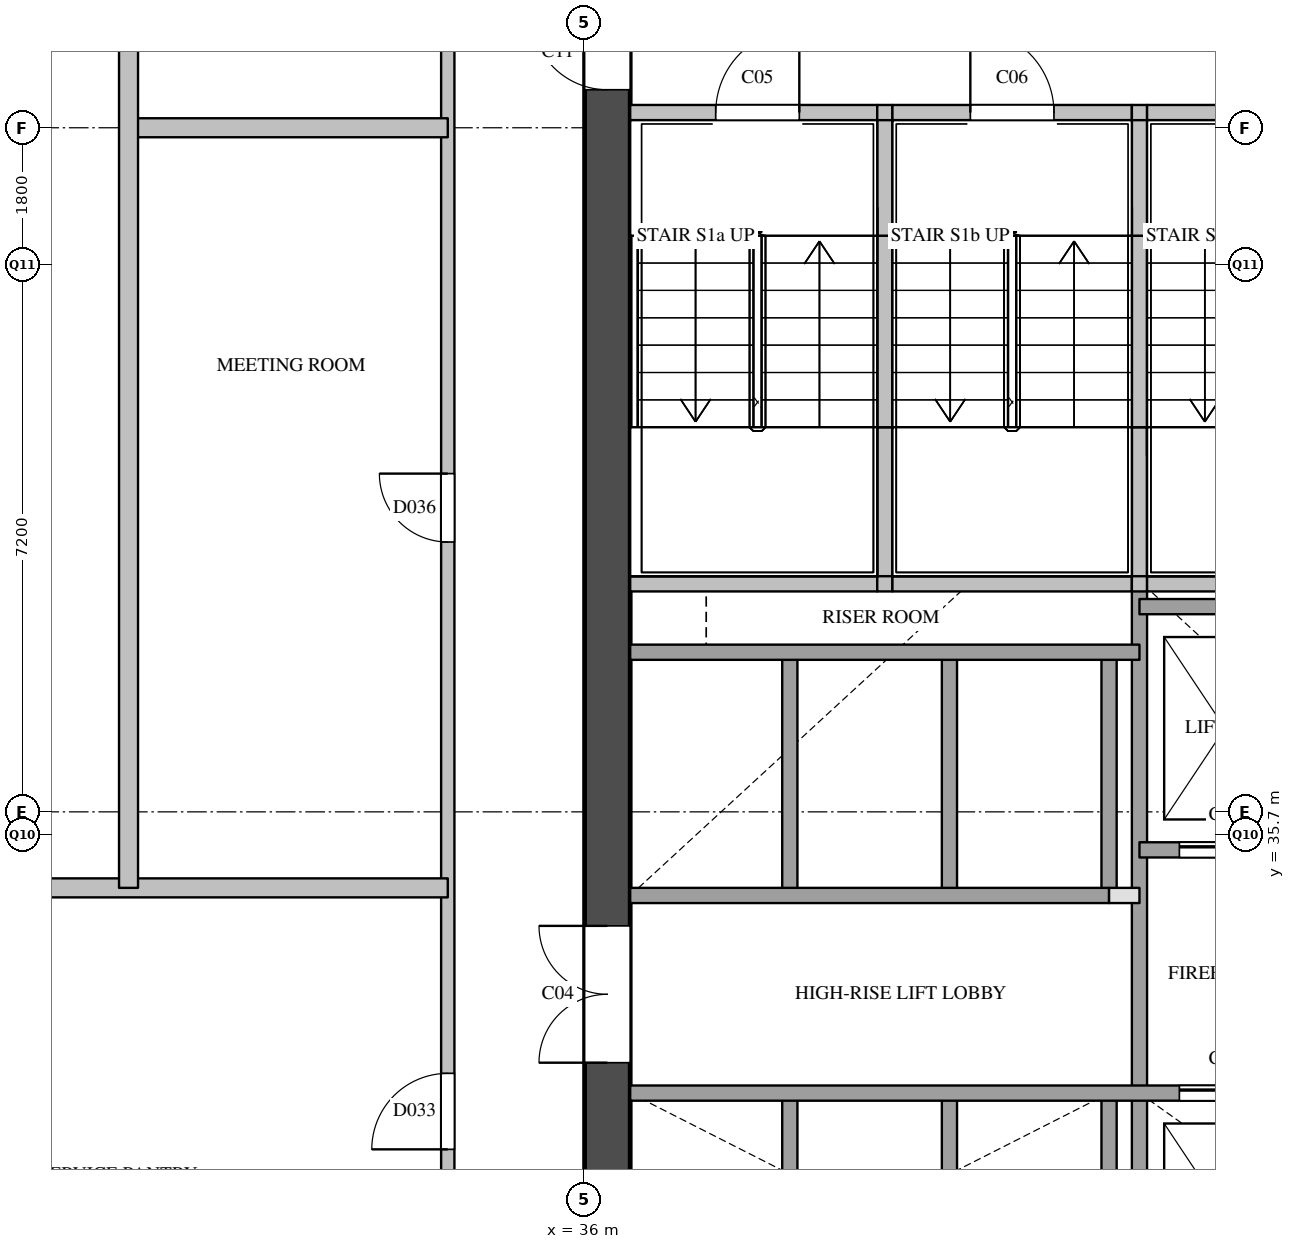
"""IFC4 building model, lengths in metres.
Left out: names, types, materials, properties, quantities, classifications, styles, units other than length and angle.
Written with IfcOpenShell. Run it as: python <this file> out.ifc"""

import sys

from ifc_helpers import new_model, si_unit, direction, frame, frame_2d, origin, place, context, subcontext, project, spatial, rectangle, extrude, element, fill, save


model = new_model("IFC4")
c1 = context("Model", 3, precision=1e-05, world=origin(), true_north=direction((0.0, 1.0)))
c2 = subcontext(c1, "Body", "Model", "MODEL_VIEW")
j1 = project(units=[si_unit("LENGTHUNIT", "METRE"), si_unit("PLANEANGLEUNIT", "RADIAN")], contexts=[c1])
p1 = place(None, origin())
s1 = spatial("IfcSite", under=j1, at=p1, CompositionType="ELEMENT")
p2 = place(p1, origin())
s2 = spatial("IfcBuilding", under=s1, at=p2, CompositionType="ELEMENT")
p3 = place(p2, frame((0.0, 0.0, 72.8)))
s3 = spatial("IfcBuildingStorey", under=s2, at=p3, CompositionType="ELEMENT", Elevation=72.8)
p4 = place(p3, frame((36.3, 29.1, 0.0), z_axis=(0.0, 0.0, 1.0), x_axis=(0.0, 1.0, 0.0)))
e1 = element("IfcWall", 1, at=p4, inside=s3, PredefinedType="SHEAR", context=c2, shape_type="SweptSolid", body=[
    extrude(rectangle(XDim=20.3, YDim=0.6, at=frame_2d((10.15, 0.0))), origin(), (0.0, 0.0, 1.0), 4.7),
])
p5 = place(p4, frame((3.6, 0.0, 0.0)))
e2 = element("IfcOpeningElement", 2, at=p5, cuts=e1, PredefinedType="OPENING", context=c2, shape_type="SweptSolid", body=[
    extrude(rectangle(XDim=1.8, YDim=2.1, at=frame_2d((0.9, 1.05))), frame((0.0, 0.31, 0.0), z_axis=(0.0, -1.0, 0.0), x_axis=(1.0, 0.0, 0.0)), (0.0, 0.0, 1.0), 0.62),
])
p6 = place(p4, frame((16.4, 0.0, 0.0)))
e3 = element("IfcOpeningElement", 3, at=p6, cuts=e1, PredefinedType="OPENING", context=c2, shape_type="SweptSolid", body=[
    extrude(rectangle(XDim=1.0, YDim=2.1, at=frame_2d((0.5, 1.05))), frame((0.0, 0.31, 0.0), z_axis=(0.0, -1.0, 0.0), x_axis=(1.0, 0.0, 0.0)), (0.0, 0.0, 1.0), 0.62),
])
p7 = place(p3, frame((38.7, 29.1, 0.0), z_axis=(0.0, 0.0, 1.0), x_axis=(0.0, 1.0, 0.0)))
e4 = element("IfcWall", 4, at=p7, inside=s3, PredefinedType="SOLIDWALL", context=c2, shape_type="SweptSolid", body=[
    extrude(rectangle(XDim=3.2, YDim=0.2, at=frame_2d((1.6, 0.0))), origin(), (0.0, 0.0, 1.0), 4.7),
])
p8 = place(p3, frame((38.7, 34.9, 0.0), z_axis=(0.0, 0.0, 1.0), x_axis=(0.0, 1.0, 0.0)))
e5 = element("IfcWall", 5, at=p8, inside=s3, PredefinedType="SOLIDWALL", context=c2, shape_type="SweptSolid", body=[
    extrude(rectangle(XDim=3.2, YDim=0.2, at=frame_2d((1.6, 0.0))), origin(), (0.0, 0.0, 1.0), 4.7),
])
p9 = place(p3, frame((39.95, 39.0, 0.0), z_axis=(0.0, 0.0, 1.0), x_axis=(0.0, 1.0, 0.0)))
e6 = element("IfcWall", 6, at=p9, inside=s3, PredefinedType="SOLIDWALL", context=c2, shape_type="SweptSolid", body=[
    extrude(rectangle(XDim=2.06, YDim=0.2, at=frame_2d((1.03, 0.0))), origin(), (0.0, 0.0, 1.0), 4.7),
])
p10 = place(p3, frame((39.95, 41.06, 0.0), z_axis=(0.0, 0.0, 1.0), x_axis=(0.0, 1.0, 0.0)))
e7 = element("IfcWall", 7, at=p10, inside=s3, PredefinedType="SOLIDWALL", context=c2, shape_type="SweptSolid", body=[
    extrude(rectangle(XDim=2.52, YDim=0.2, at=frame_2d((1.26, 0.0))), origin(), (0.0, 0.0, 1.0), 4.7),
])
p11 = place(p3, frame((39.95, 43.58, 0.0), z_axis=(0.0, 0.0, 1.0), x_axis=(0.0, 1.0, 0.0)))
e8 = element("IfcWall", 8, at=p11, inside=s3, PredefinedType="SOLIDWALL", context=c2, shape_type="SweptSolid", body=[
    extrude(rectangle(XDim=1.62, YDim=0.2, at=frame_2d((0.81, 0.0))), origin(), (0.0, 0.0, 1.0), 4.7),
])
p12 = place(p3, frame((40.8, 29.1, 0.0), z_axis=(0.0, 0.0, 1.0), x_axis=(0.0, 1.0, 0.0)))
e9 = element("IfcWall", 9, at=p12, inside=s3, PredefinedType="SOLIDWALL", context=c2, shape_type="SweptSolid", body=[
    extrude(rectangle(XDim=3.2, YDim=0.2, at=frame_2d((1.6, 0.0))), origin(), (0.0, 0.0, 1.0), 4.7),
])
p13 = place(p3, frame((40.8, 34.9, 0.0), z_axis=(0.0, 0.0, 1.0), x_axis=(0.0, 1.0, 0.0)))
e10 = element("IfcWall", 10, at=p13, inside=s3, PredefinedType="SOLIDWALL", context=c2, shape_type="SweptSolid", body=[
    extrude(rectangle(XDim=3.2, YDim=0.2, at=frame_2d((1.6, 0.0))), origin(), (0.0, 0.0, 1.0), 4.7),
])
p14 = place(p3, frame((42.9, 29.1, 0.0), z_axis=(0.0, 0.0, 1.0), x_axis=(0.0, 1.0, 0.0)))
e11 = element("IfcWall", 11, at=p14, inside=s3, PredefinedType="SOLIDWALL", context=c2, shape_type="SweptSolid", body=[
    extrude(rectangle(XDim=3.2, YDim=0.2, at=frame_2d((1.6, 0.0))), origin(), (0.0, 0.0, 1.0), 4.7),
])
p15 = place(p3, frame((42.9, 34.9, 0.0), z_axis=(0.0, 0.0, 1.0), x_axis=(0.0, 1.0, 0.0)))
e12 = element("IfcWall", 12, at=p15, inside=s3, PredefinedType="SOLIDWALL", context=c2, shape_type="SweptSolid", body=[
    extrude(rectangle(XDim=3.2, YDim=0.2, at=frame_2d((1.6, 0.0))), origin(), (0.0, 0.0, 1.0), 4.7),
])
p16 = place(p3, frame((43.3, 29.1, 0.0), z_axis=(0.0, 0.0, 1.0), x_axis=(0.0, 1.0, 0.0)))
e13 = element("IfcWall", 13, at=p16, inside=s3, PredefinedType="SOLIDWALL", context=c2, shape_type="SweptSolid", body=[
    extrude(rectangle(XDim=9.9, YDim=0.2, at=frame_2d((4.95, 0.0))), origin(), (0.0, 0.0, 1.0), 4.7),
])
p17 = place(p3, frame((43.3, 39.0, 0.0), z_axis=(0.0, 0.0, 1.0), x_axis=(0.0, 1.0, 0.0)))
e14 = element("IfcWall", 14, at=p17, inside=s3, PredefinedType="SOLIDWALL", context=c2, shape_type="SweptSolid", body=[
    extrude(rectangle(XDim=2.06, YDim=0.2, at=frame_2d((1.03, 0.0))), origin(), (0.0, 0.0, 1.0), 4.7),
])
p18 = place(p3, frame((43.3, 41.06, 0.0), z_axis=(0.0, 0.0, 1.0), x_axis=(0.0, 1.0, 0.0)))
e15 = element("IfcWall", 15, at=p18, inside=s3, PredefinedType="SOLIDWALL", context=c2, shape_type="SweptSolid", body=[
    extrude(rectangle(XDim=2.52, YDim=0.2, at=frame_2d((1.26, 0.0))), origin(), (0.0, 0.0, 1.0), 4.7),
])
p19 = place(p3, frame((43.3, 43.58, 0.0), z_axis=(0.0, 0.0, 1.0), x_axis=(0.0, 1.0, 0.0)))
e16 = element("IfcWall", 16, at=p19, inside=s3, PredefinedType="SOLIDWALL", context=c2, shape_type="SweptSolid", body=[
    extrude(rectangle(XDim=1.62, YDim=0.2, at=frame_2d((0.81, 0.0))), origin(), (0.0, 0.0, 1.0), 4.7),
])
p20 = place(p3, frame((36.6, 32.3, 0.0), z_axis=(0.0, 0.0, 1.0), x_axis=(1.0, 0.0, 0.0)))
e17 = element("IfcWall", 17, at=p20, inside=s3, PredefinedType="SOLIDWALL", context=c2, shape_type="SweptSolid", body=[
    extrude(rectangle(XDim=11.2, YDim=0.2, at=frame_2d((5.6, 0.0))), origin(), (0.0, 0.0, 1.0), 4.7),
])
p21 = place(p20, frame((7.225, 0.0, 0.0)))
e18 = element("IfcOpeningElement", 18, at=p21, cuts=e17, PredefinedType="OPENING", context=c2, shape_type="SweptSolid", body=[
    extrude(rectangle(XDim=1.2, YDim=2.1, at=frame_2d((0.6, 1.05))), frame((0.0, 0.11, 0.0), z_axis=(0.0, -1.0, 0.0), x_axis=(1.0, 0.0, 0.0)), (0.0, 0.0, 1.0), 0.22),
])
p22 = place(p20, frame((9.475, 0.0, 0.0)))
e19 = element("IfcOpeningElement", 19, at=p22, cuts=e17, PredefinedType="OPENING", context=c2, shape_type="SweptSolid", body=[
    extrude(rectangle(XDim=1.2, YDim=2.1, at=frame_2d((0.6, 1.05))), frame((0.0, 0.11, 0.0), z_axis=(0.0, -1.0, 0.0), x_axis=(1.0, 0.0, 0.0)), (0.0, 0.0, 1.0), 0.22),
])
p23 = place(p3, frame((42.9, 34.9, 0.0), z_axis=(0.0, 0.0, 1.0), x_axis=(1.0, 0.0, 0.0)))
e20 = element("IfcWall", 20, at=p23, inside=s3, PredefinedType="PARTITIONING", context=c2, shape_type="SweptSolid", body=[
    extrude(rectangle(XDim=0.4, YDim=0.2, at=frame_2d((0.2, 0.0))), origin(), (0.0, 0.0, 1.0), 4.7),
])
p24 = place(p3, frame((36.6, 34.9, 0.0), z_axis=(0.0, 0.0, 1.0), x_axis=(1.0, 0.0, 0.0)))
e21 = element("IfcWall", 21, at=p24, inside=s3, PredefinedType="SOLIDWALL", context=c2, shape_type="SweptSolid", body=[
    extrude(rectangle(XDim=6.3, YDim=0.2, at=frame_2d((3.15, 0.0))), origin(), (0.0, 0.0, 1.0), 4.7),
])
p25 = place(p3, frame((43.3, 35.5, 0.0), z_axis=(0.0, 0.0, 1.0), x_axis=(1.0, 0.0, 0.0)))
e22 = element("IfcWall", 22, at=p25, inside=s3, PredefinedType="SOLIDWALL", context=c2, shape_type="SweptSolid", body=[
    extrude(rectangle(XDim=4.5, YDim=0.2, at=frame_2d((2.25, 0.0))), origin(), (0.0, 0.0, 1.0), 4.7),
])
p26 = place(p25, frame((0.525, 0.0, 0.0)))
e23 = element("IfcOpeningElement", 23, at=p26, cuts=e22, PredefinedType="OPENING", context=c2, shape_type="SweptSolid", body=[
    extrude(rectangle(XDim=1.2, YDim=2.1, at=frame_2d((0.6, 1.05))), frame((0.0, 0.11, 0.0), z_axis=(0.0, -1.0, 0.0), x_axis=(1.0, 0.0, 0.0)), (0.0, 0.0, 1.0), 0.22),
])
p27 = place(p25, frame((3.025, 0.0, 0.0)))
e24 = element("IfcOpeningElement", 24, at=p27, cuts=e22, PredefinedType="OPENING", context=c2, shape_type="SweptSolid", body=[
    extrude(rectangle(XDim=0.7, YDim=2.1, at=frame_2d((0.35, 1.05))), frame((0.0, 0.11, 0.0), z_axis=(0.0, -1.0, 0.0), x_axis=(1.0, 0.0, 0.0)), (0.0, 0.0, 1.0), 0.22),
])
p28 = place(p3, frame((36.6, 38.1, 0.0), z_axis=(0.0, 0.0, 1.0), x_axis=(1.0, 0.0, 0.0)))
e25 = element("IfcWall", 25, at=p28, inside=s3, PredefinedType="SOLIDWALL", context=c2, shape_type="SweptSolid", body=[
    extrude(rectangle(XDim=6.7, YDim=0.2, at=frame_2d((3.35, 0.0))), origin(), (0.0, 0.0, 1.0), 4.7),
])
p29 = place(p3, frame((43.3, 38.7, 0.0), z_axis=(0.0, 0.0, 1.0), x_axis=(1.0, 0.0, 0.0)))
e26 = element("IfcWall", 26, at=p29, inside=s3, PredefinedType="SOLIDWALL", context=c2, shape_type="SweptSolid", body=[
    extrude(rectangle(XDim=4.5, YDim=0.2, at=frame_2d((2.25, 0.0))), origin(), (0.0, 0.0, 1.0), 4.7),
])
p30 = place(p3, frame((36.6, 39.0, 0.0), z_axis=(0.0, 0.0, 1.0), x_axis=(1.0, 0.0, 0.0)))
e27 = element("IfcWall", 27, at=p30, inside=s3, PredefinedType="SOLIDWALL", context=c2, shape_type="SweptSolid", body=[
    extrude(rectangle(XDim=3.25, YDim=0.2, at=frame_2d((1.625, 0.0))), origin(), (0.0, 0.0, 1.0), 4.7),
])
p31 = place(p3, frame((39.85, 39.0, 0.0), z_axis=(0.0, 0.0, 1.0), x_axis=(1.0, 0.0, 0.0)))
e28 = element("IfcWall", 28, at=p31, inside=s3, PredefinedType="SOLIDWALL", context=c2, shape_type="SweptSolid", body=[
    extrude(rectangle(XDim=0.2, YDim=0.2, at=frame_2d((0.1, 0.0))), origin(), (0.0, 0.0, 1.0), 4.7),
])
p32 = place(p3, frame((40.05, 39.0, 0.0), z_axis=(0.0, 0.0, 1.0), x_axis=(1.0, 0.0, 0.0)))
e29 = element("IfcWall", 29, at=p32, inside=s3, PredefinedType="SOLIDWALL", context=c2, shape_type="SweptSolid", body=[
    extrude(rectangle(XDim=3.15, YDim=0.2, at=frame_2d((1.575, 0.0))), origin(), (0.0, 0.0, 1.0), 4.7),
])
p33 = place(p3, frame((43.2, 39.0, 0.0), z_axis=(0.0, 0.0, 1.0), x_axis=(1.0, 0.0, 0.0)))
e30 = element("IfcWall", 30, at=p33, inside=s3, PredefinedType="SOLIDWALL", context=c2, shape_type="SweptSolid", body=[
    extrude(rectangle(XDim=0.2, YDim=0.2, at=frame_2d((0.1, 0.0))), origin(), (0.0, 0.0, 1.0), 4.7),
])
p34 = place(p3, frame((43.4, 39.0, 0.0), z_axis=(0.0, 0.0, 1.0), x_axis=(1.0, 0.0, 0.0)))
e31 = element("IfcWall", 31, at=p34, inside=s3, PredefinedType="SOLIDWALL", context=c2, shape_type="SweptSolid", body=[
    extrude(rectangle(XDim=3.25, YDim=0.2, at=frame_2d((1.625, 0.0))), origin(), (0.0, 0.0, 1.0), 4.7),
])
p35 = place(p3, frame((36.6, 45.2, 0.0), z_axis=(0.0, 0.0, 1.0), x_axis=(1.0, 0.0, 0.0)))
e32 = element("IfcWall", 32, at=p35, inside=s3, PredefinedType="SOLIDWALL", context=c2, shape_type="SweptSolid", body=[
    extrude(rectangle(XDim=3.25, YDim=0.2, at=frame_2d((1.625, 0.0))), origin(), (0.0, 0.0, 1.0), 4.7),
])
p36 = place(p35, frame((1.125, 0.0, 0.0)))
e33 = element("IfcOpeningElement", 33, at=p36, cuts=e32, PredefinedType="OPENING", context=c2, shape_type="SweptSolid", body=[
    extrude(rectangle(XDim=1.1, YDim=2.1, at=frame_2d((0.55, 1.05))), frame((0.0, 0.11, 0.0), z_axis=(0.0, -1.0, 0.0), x_axis=(1.0, 0.0, 0.0)), (0.0, 0.0, 1.0), 0.22),
])
p37 = place(p3, frame((39.85, 45.2, 0.0), z_axis=(0.0, 0.0, 1.0), x_axis=(1.0, 0.0, 0.0)))
e34 = element("IfcWall", 34, at=p37, inside=s3, PredefinedType="SOLIDWALL", context=c2, shape_type="SweptSolid", body=[
    extrude(rectangle(XDim=0.2, YDim=0.2, at=frame_2d((0.1, 0.0))), origin(), (0.0, 0.0, 1.0), 4.7),
])
p38 = place(p3, frame((40.05, 45.2, 0.0), z_axis=(0.0, 0.0, 1.0), x_axis=(1.0, 0.0, 0.0)))
e35 = element("IfcWall", 35, at=p38, inside=s3, PredefinedType="SOLIDWALL", context=c2, shape_type="SweptSolid", body=[
    extrude(rectangle(XDim=3.15, YDim=0.2, at=frame_2d((1.575, 0.0))), origin(), (0.0, 0.0, 1.0), 4.7),
])
p39 = place(p38, frame((1.025, 0.0, 0.0)))
e36 = element("IfcOpeningElement", 36, at=p39, cuts=e35, PredefinedType="OPENING", context=c2, shape_type="SweptSolid", body=[
    extrude(rectangle(XDim=1.1, YDim=2.1, at=frame_2d((0.55, 1.05))), frame((0.0, 0.11, 0.0), z_axis=(0.0, -1.0, 0.0), x_axis=(1.0, 0.0, 0.0)), (0.0, 0.0, 1.0), 0.22),
])
p40 = place(p3, frame((43.2, 45.2, 0.0), z_axis=(0.0, 0.0, 1.0), x_axis=(1.0, 0.0, 0.0)))
e37 = element("IfcWall", 37, at=p40, inside=s3, PredefinedType="SOLIDWALL", context=c2, shape_type="SweptSolid", body=[
    extrude(rectangle(XDim=0.2, YDim=0.2, at=frame_2d((0.1, 0.0))), origin(), (0.0, 0.0, 1.0), 4.7),
])
p41 = place(p3, frame((43.4, 45.2, 0.0), z_axis=(0.0, 0.0, 1.0), x_axis=(1.0, 0.0, 0.0)))
e38 = element("IfcWall", 38, at=p41, inside=s3, PredefinedType="SOLIDWALL", context=c2, shape_type="SweptSolid", body=[
    extrude(rectangle(XDim=3.25, YDim=0.2, at=frame_2d((1.625, 0.0))), origin(), (0.0, 0.0, 1.0), 4.7),
])
p42 = place(p41, frame((1.025, 0.0, 0.0)))
e39 = element("IfcOpeningElement", 39, at=p42, cuts=e38, PredefinedType="OPENING", context=c2, shape_type="SweptSolid", body=[
    extrude(rectangle(XDim=1.1, YDim=2.1, at=frame_2d((0.55, 1.05))), frame((0.0, 0.11, 0.0), z_axis=(0.0, -1.0, 0.0), x_axis=(1.0, 0.0, 0.0)), (0.0, 0.0, 1.0), 0.22),
])
p43 = place(p3, frame((34.2, 29.12, 0.0), z_axis=(0.0, 0.0, 1.0), x_axis=(0.0, 1.0, 0.0)))
e40 = element("IfcWall", 40, at=p43, inside=s3, PredefinedType="PARTITIONING", context=c2, shape_type="SweptSolid", body=[
    extrude(rectangle(XDim=22.68, YDim=0.175, at=frame_2d((11.34, 0.0))), origin(), (0.0, 0.0, 1.0), 4.7),
])
p44 = place(p43, frame((2.44, 0.0, 0.0)))
e41 = element("IfcOpeningElement", 41, at=p44, cuts=e40, PredefinedType="OPENING", context=c2, shape_type="SweptSolid", body=[
    extrude(rectangle(XDim=1.0, YDim=2.1, at=frame_2d((0.5, 1.05))), frame((0.0, 0.097, 0.0), z_axis=(0.0, -1.0, 0.0), x_axis=(1.0, 0.0, 0.0)), (0.0, 0.0, 1.0), 0.195),
])
p45 = place(p43, frame((10.43, 0.0, 0.0)))
e42 = element("IfcOpeningElement", 42, at=p45, cuts=e40, PredefinedType="OPENING", context=c2, shape_type="SweptSolid", body=[
    extrude(rectangle(XDim=0.9, YDim=2.1, at=frame_2d((0.45, 1.05))), frame((0.0, 0.097, 0.0), z_axis=(0.0, -1.0, 0.0), x_axis=(1.0, 0.0, 0.0)), (0.0, 0.0, 1.0), 0.195),
])
p46 = place(p43, frame((18.83, 0.0, 0.0)))
e43 = element("IfcOpeningElement", 43, at=p46, cuts=e40, PredefinedType="OPENING", context=c2, shape_type="SweptSolid", body=[
    extrude(rectangle(XDim=0.9, YDim=2.1, at=frame_2d((0.45, 1.05))), frame((0.0, 0.097, 0.0), z_axis=(0.0, -1.0, 0.0), x_axis=(1.0, 0.0, 0.0)), (0.0, 0.0, 1.0), 0.195),
])
p47 = place(p3, frame((19.875, 35.0, 0.0), z_axis=(0.0, 0.0, 1.0), x_axis=(1.0, 0.0, 0.0)))
e44 = element("IfcWall", 44, at=p47, inside=s3, PredefinedType="PARTITIONING", context=c2, shape_type="SweptSolid", body=[
    extrude(rectangle(XDim=14.325, YDim=0.25, at=frame_2d((7.163, 0.0))), origin(), (0.0, 0.0, 1.0), 3.7),
])
p48 = place(p3, frame((30.0, 45.0, 0.0), z_axis=(0.0, 0.0, 1.0), x_axis=(1.0, 0.0, 0.0)))
e45 = element("IfcWall", 45, at=p48, inside=s3, PredefinedType="PARTITIONING", context=c2, shape_type="SweptSolid", body=[
    extrude(rectangle(XDim=4.2, YDim=0.25, at=frame_2d((2.1, 0.0))), origin(), (0.0, 0.0, 1.0), 4.7),
])
p49 = place(p3, frame((30.0, 35.0, 0.0), z_axis=(0.0, 0.0, 1.0), x_axis=(0.0, 1.0, 0.0)))
e46 = element("IfcWall", 46, at=p49, inside=s3, PredefinedType="PARTITIONING", context=c2, shape_type="SweptSolid", body=[
    extrude(rectangle(XDim=19.0, YDim=0.25, at=frame_2d((9.5, 0.0))), origin(), (0.0, 0.0, 1.0), 3.7),
])
p50 = place(p21, origin())
e47 = element("IfcDoor", 47, at=p50, inside=s3, OperationType="SLIDING_TO_LEFT", PredefinedType="DOOR", context=c2, shape_type="SweptSolid", body=[
    extrude(rectangle(XDim=1.2, YDim=2.1, at=frame_2d((0.6, 1.05))), frame((0.0, 0.025, 0.0), z_axis=(0.0, -1.0, 0.0), x_axis=(1.0, 0.0, 0.0)), (0.0, 0.0, 1.0), 0.05),
])
fill(e18, e47)
p51 = place(p26, origin())
e48 = element("IfcDoor", 48, at=p51, inside=s3, OperationType="SLIDING_TO_LEFT", PredefinedType="DOOR", context=c2, shape_type="SweptSolid", body=[
    extrude(rectangle(XDim=1.2, YDim=2.1, at=frame_2d((0.6, 1.05))), frame((0.0, 0.025, 0.0), z_axis=(0.0, -1.0, 0.0), x_axis=(1.0, 0.0, 0.0)), (0.0, 0.0, 1.0), 0.05),
])
fill(e23, e48)
p52 = place(p5, origin())
e49 = element("IfcDoor", 49, at=p52, inside=s3, OperationType="DOUBLE_DOOR_SINGLE_SWING", PredefinedType="DOOR", context=c2, shape_type="SweptSolid", body=[
    extrude(rectangle(XDim=1.8, YDim=2.1, at=frame_2d((0.9, 1.05))), frame((0.0, 0.025, 0.0), z_axis=(0.0, -1.0, 0.0), x_axis=(1.0, 0.0, 0.0)), (0.0, 0.0, 1.0), 0.05),
])
fill(e2, e49)
p53 = place(p36, origin())
e50 = element("IfcDoor", 50, at=p53, inside=s3, OperationType="SINGLE_SWING_RIGHT", PredefinedType="DOOR", context=c2, shape_type="SweptSolid", body=[
    extrude(rectangle(XDim=1.1, YDim=2.1, at=frame_2d((0.55, 1.05))), frame((0.0, 0.025, 0.0), z_axis=(0.0, -1.0, 0.0), x_axis=(1.0, 0.0, 0.0)), (0.0, 0.0, 1.0), 0.05),
])
fill(e33, e50)
p54 = place(p39, origin())
e51 = element("IfcDoor", 51, at=p54, inside=s3, OperationType="SINGLE_SWING_LEFT", PredefinedType="DOOR", context=c2, shape_type="SweptSolid", body=[
    extrude(rectangle(XDim=1.1, YDim=2.1, at=frame_2d((0.55, 1.05))), frame((0.0, 0.025, 0.0), z_axis=(0.0, -1.0, 0.0), x_axis=(1.0, 0.0, 0.0)), (0.0, 0.0, 1.0), 0.05),
])
fill(e36, e51)
p55 = place(p6, origin())
e52 = element("IfcDoor", 52, at=p55, inside=s3, OperationType="SINGLE_SWING_RIGHT", PredefinedType="DOOR", context=c2, shape_type="SweptSolid", body=[
    extrude(rectangle(XDim=1.0, YDim=2.1, at=frame_2d((0.5, 1.05))), frame((0.0, 0.025, 0.0), z_axis=(0.0, -1.0, 0.0), x_axis=(1.0, 0.0, 0.0)), (0.0, 0.0, 1.0), 0.05),
])
fill(e3, e52)
p56 = place(p44, origin())
e53 = element("IfcDoor", 53, at=p56, inside=s3, OperationType="SINGLE_SWING_LEFT", PredefinedType="DOOR", context=c2, shape_type="SweptSolid", body=[
    extrude(rectangle(XDim=1.0, YDim=2.1, at=frame_2d((0.5, 1.05))), frame((0.0, 0.025, 0.0), z_axis=(0.0, -1.0, 0.0), x_axis=(1.0, 0.0, 0.0)), (0.0, 0.0, 1.0), 0.05),
])
fill(e41, e53)
p57 = place(p45, origin())
e54 = element("IfcDoor", 54, at=p57, inside=s3, OperationType="SINGLE_SWING_RIGHT", PredefinedType="DOOR", context=c2, shape_type="SweptSolid", body=[
    extrude(rectangle(XDim=0.9, YDim=2.1, at=frame_2d((0.45, 1.05))), frame((0.0, 0.025, 0.0), z_axis=(0.0, -1.0, 0.0), x_axis=(1.0, 0.0, 0.0)), (0.0, 0.0, 1.0), 0.05),
])
fill(e42, e54)
save(model, sys.argv[1])
